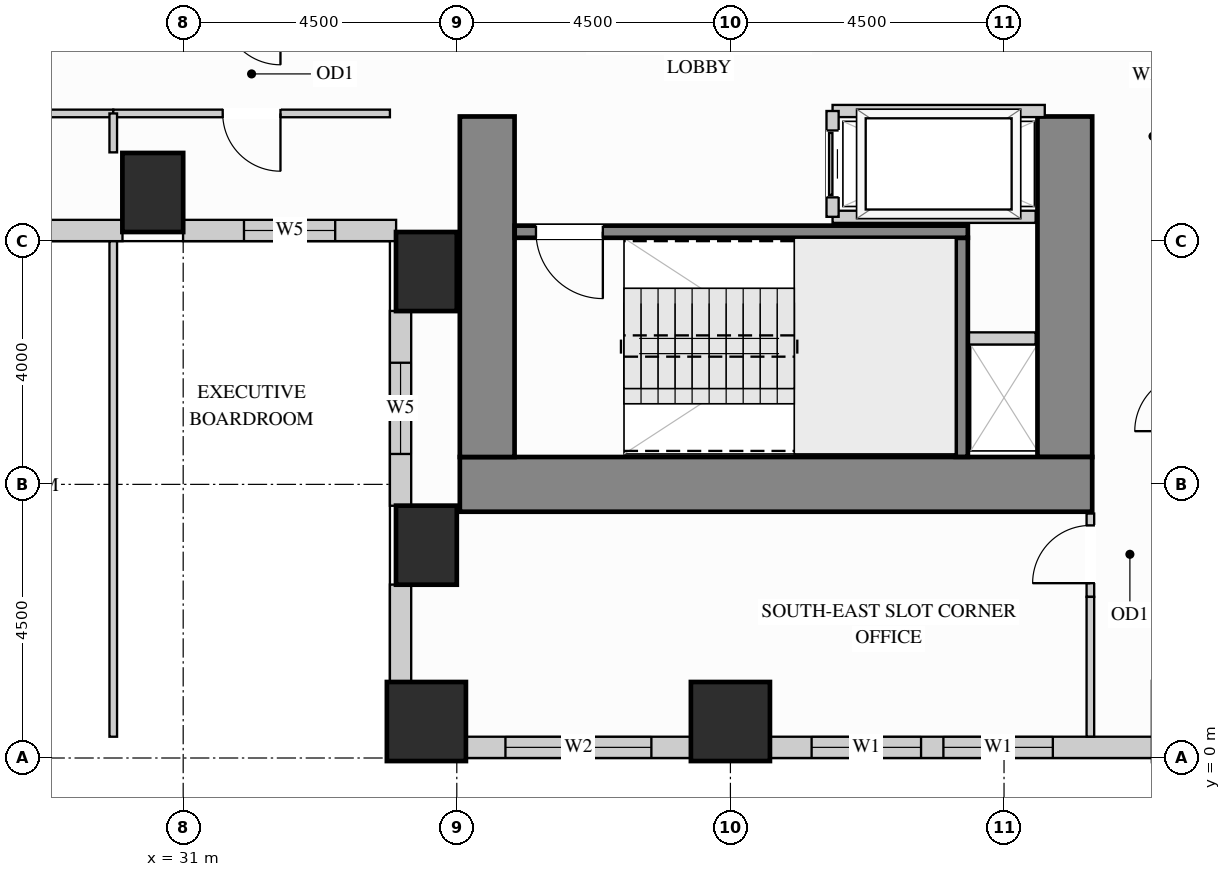
"""IFC4 building model, lengths in metres.
Left out: names, types, materials, properties, quantities, classifications, styles, units other than length and angle.
Written with IfcOpenShell. Run it as: python <this file> out.ifc"""

import sys

from ifc_helpers import new_model, si_unit, direction, frame, frame_2d, origin, origin_2d, place, context, subcontext, project, spatial, rectangle, extrude, source, transform, mapped, element, fill, save


model = new_model("IFC4")
c1 = context("Model", 3, precision=1e-05, world=origin(), true_north=direction((0.0, 1.0)))
c2 = subcontext(c1, "Body", "Model", "MODEL_VIEW")
j1 = project(units=[si_unit("LENGTHUNIT", "METRE"), si_unit("PLANEANGLEUNIT", "RADIAN")], contexts=[c1])
p1 = place(None, origin())
s1 = spatial("IfcSite", under=j1, at=p1, CompositionType="ELEMENT")
p2 = place(p1, origin())
s2 = spatial("IfcBuilding", under=s1, at=p2, CompositionType="ELEMENT")
p3 = place(p2, frame((0.0, 0.0, 69.3)))
s3 = spatial("IfcBuildingStorey", under=s2, at=p3, CompositionType="ELEMENT", Elevation=69.3)
m1 = source(origin(), c2, "Body", "SweptSolid", [
    extrude(rectangle(XDim=1.0, YDim=1.3, at=origin_2d()), origin(), (0.0, 0.0, 1.0), 3.32),
])
for number, where, z_axis, x_axis in (
    (1, (35.0, 3.5, 0.0), (0.0, 0.0, 1.0), (1.0, 0.0, 0.0)),
    (2, (35.0, 8.0, 0.0), (0.0, 0.0, 1.0), (1.0, 0.0, 0.0)),
    (3, (30.5, 9.3, 0.0), (0.0, 0.0, 1.0), (1.0, 0.0, 0.0)),
):
    element("IfcColumn", number, at=place(p3, frame(where, z_axis=z_axis, x_axis=x_axis)), inside=s3, PredefinedType="COLUMN", context=c2, shape_type="MappedRepresentation", body=[
        mapped(m1, transform((0.0, 0.0, 0.0), x_axis=(1.0, 0.0, 0.0), y_axis=(0.0, 1.0, 0.0), z_axis=(0.0, 0.0, 1.0))),
    ])
m2 = source(origin(), c2, "Body", "SweptSolid", [
    extrude(rectangle(XDim=1.3, YDim=1.3, at=origin_2d()), origin(), (0.0, 0.0, 1.0), 3.32),
])
for number, where, z_axis, x_axis in (
    (4, (35.0, 0.6, 0.0), (0.0, 0.0, 1.0), (1.0, 0.0, 0.0)),
    (5, (40.0, 0.6, 0.0), (0.0, 0.0, 1.0), (1.0, 0.0, 0.0)),
):
    element("IfcColumn", number, at=place(p3, frame(where, z_axis=z_axis, x_axis=x_axis)), inside=s3, PredefinedType="COLUMN", context=c2, shape_type="MappedRepresentation", body=[
        mapped(m2, transform((0.0, 0.0, 0.0), x_axis=(1.0, 0.0, 0.0), y_axis=(0.0, 1.0, 0.0), z_axis=(0.0, 0.0, 1.0))),
    ])
m3 = source(origin(), c2, "Body", "SweptSolid", [
    extrude(rectangle(XDim=5.6, YDim=0.9, at=frame_2d((2.8, 0.0))), origin(), (0.0, 0.0, 1.0), 3.32),
])
p4 = place(p3, frame((45.5, 4.95, 0.0), z_axis=(0.0, 0.0, 1.0), x_axis=(0.0, 1.0, 0.0)))
e6 = element("IfcWall", 6, at=p4, inside=s3, PredefinedType="SHEAR", context=c2, shape_type="MappedRepresentation", body=[
    mapped(m3, transform((0.0, 0.0, 0.0), x_axis=(1.0, 0.0, 0.0), y_axis=(0.0, 1.0, 0.0), z_axis=(0.0, 0.0, 1.0))),
])
m4 = source(origin(), c2, "Body", "SweptSolid", [
    extrude(rectangle(XDim=10.4, YDim=0.9, at=frame_2d((5.2, 0.0))), origin(), (0.0, 0.0, 1.0), 3.32),
])
p5 = place(p3, frame((35.55, 4.5, 0.0), z_axis=(0.0, 0.0, 1.0), x_axis=(1.0, 0.0, 0.0)))
e7 = element("IfcWall", 7, at=p5, inside=s3, PredefinedType="SHEAR", context=c2, shape_type="MappedRepresentation", body=[
    mapped(m4, transform((0.0, 0.0, 0.0), x_axis=(1.0, 0.0, 0.0), y_axis=(0.0, 1.0, 0.0), z_axis=(0.0, 0.0, 1.0))),
])
p6 = place(p3, frame((36.0, 4.95, 0.0), z_axis=(0.0, 0.0, 1.0), x_axis=(0.0, 1.0, 0.0)))
e8 = element("IfcWall", 8, at=p6, inside=s3, PredefinedType="SHEAR", context=c2, shape_type="MappedRepresentation", body=[
    mapped(m3, transform((0.0, 0.0, 0.0), x_axis=(1.0, 0.0, 0.0), y_axis=(0.0, 1.0, 0.0), z_axis=(0.0, 0.0, 1.0))),
])
p7 = place(p3, frame((23.898, 8.675, 0.0), z_axis=(0.0, 0.0, 1.0), x_axis=(1.0, 0.0, 0.0)))
e9 = element("IfcWall", 9, at=p7, inside=s3, PredefinedType="SOLIDWALL", context=c2, shape_type="SweptSolid", body=[
    extrude(rectangle(XDim=6.104, YDim=0.35, at=frame_2d((3.052, 0.0))), origin(), (0.0, 0.0, 1.0), 3.305),
])
p8 = place(p7, frame((1.114, 0.0, 0.78)))
e10 = element("IfcOpeningElement", 10, at=p8, cuts=e9, PredefinedType="OPENING", context=c2, shape_type="SweptSolid", body=[
    extrude(rectangle(XDim=1.5, YDim=2.0, at=frame_2d((0.75, 1.0))), frame((0.0, 0.185, 0.0), z_axis=(0.0, -1.0, 0.0), x_axis=(1.0, 0.0, 0.0)), (0.0, 0.0, 1.0), 0.37),
])
p9 = place(p7, frame((3.408, 0.0, 0.78)))
e11 = element("IfcOpeningElement", 11, at=p9, cuts=e9, PredefinedType="OPENING", context=c2, shape_type="SweptSolid", body=[
    extrude(rectangle(XDim=1.5, YDim=2.0, at=frame_2d((0.75, 1.0))), frame((0.0, 0.185, 0.0), z_axis=(0.0, -1.0, 0.0), x_axis=(1.0, 0.0, 0.0)), (0.0, 0.0, 1.0), 0.37),
])
p10 = place(p3, frame((30.998, 8.675, 0.0), z_axis=(0.0, 0.0, 1.0), x_axis=(1.0, 0.0, 0.0)))
e12 = element("IfcWall", 12, at=p10, inside=s3, PredefinedType="SOLIDWALL", context=c2, shape_type="SweptSolid", body=[
    extrude(rectangle(XDim=3.504, YDim=0.35, at=frame_2d((1.752, 0.0))), origin(), (0.0, 0.0, 1.0), 3.305),
])
p11 = place(p10, frame((1.002, 0.0, 0.78)))
e13 = element("IfcOpeningElement", 13, at=p11, cuts=e12, PredefinedType="OPENING", context=c2, shape_type="SweptSolid", body=[
    extrude(rectangle(XDim=1.5, YDim=2.0, at=frame_2d((0.75, 1.0))), frame((0.0, 0.185, 0.0), z_axis=(0.0, -1.0, 0.0), x_axis=(1.0, 0.0, 0.0)), (0.0, 0.0, 1.0), 0.37),
])
p12 = place(p3, frame((34.575, 7.352, 0.0), z_axis=(0.0, 0.0, 1.0), x_axis=(0.0, -1.0, 0.0)))
e14 = element("IfcWall", 14, at=p12, inside=s3, PredefinedType="SOLIDWALL", context=c2, shape_type="SweptSolid", body=[
    extrude(rectangle(XDim=3.204, YDim=0.35, at=frame_2d((1.602, 0.0))), origin(), (0.0, 0.0, 1.0), 2.45),
])
p13 = place(p12, frame((0.852, 0.0, 0.78)))
e15 = element("IfcOpeningElement", 15, at=p13, cuts=e14, PredefinedType="OPENING", context=c2, shape_type="SweptSolid", body=[
    extrude(rectangle(XDim=1.5, YDim=1.49, at=frame_2d((0.75, 0.745))), frame((0.0, 0.185, 0.0), z_axis=(0.0, -1.0, 0.0), x_axis=(1.0, 0.0, 0.0)), (0.0, 0.0, 1.0), 0.37),
])
m5 = source(origin(), c2, "Body", "SweptSolid", [
    extrude(rectangle(XDim=1.604, YDim=0.35, at=frame_2d((0.802, 0.0))), origin(), (0.0, 0.0, 1.0), 2.45),
])
p14 = place(p3, frame((34.575, 2.852, 0.0), z_axis=(0.0, 0.0, 1.0), x_axis=(0.0, -1.0, 0.0)))
e16 = element("IfcWall", 16, at=p14, inside=s3, PredefinedType="SOLIDWALL", context=c2, shape_type="MappedRepresentation", body=[
    mapped(m5, transform((0.0, 0.0, 0.0), x_axis=(1.0, 0.0, 0.0), y_axis=(0.0, 1.0, 0.0), z_axis=(0.0, 0.0, 1.0))),
])
p15 = place(p3, frame((35.648, 0.175, 0.0), z_axis=(0.0, 0.0, 1.0), x_axis=(1.0, 0.0, 0.0)))
e17 = element("IfcWall", 17, at=p15, inside=s3, PredefinedType="SOLIDWALL", context=c2, shape_type="SweptSolid", body=[
    extrude(rectangle(XDim=3.704, YDim=0.35, at=frame_2d((1.852, 0.0))), origin(), (0.0, 0.0, 1.0), 2.45),
])
p16 = place(p15, frame((0.652, 0.0, 0.78)))
e18 = element("IfcOpeningElement", 18, at=p16, cuts=e17, PredefinedType="OPENING", context=c2, shape_type="SweptSolid", body=[
    extrude(rectangle(XDim=2.4, YDim=1.49, at=frame_2d((1.2, 0.745))), frame((0.0, 0.185, 0.0), z_axis=(0.0, -1.0, 0.0), x_axis=(1.0, 0.0, 0.0)), (0.0, 0.0, 1.0), 0.37),
])
p17 = place(p3, frame((40.648, 0.175, 0.0), z_axis=(0.0, 0.0, 1.0), x_axis=(1.0, 0.0, 0.0)))
e19 = element("IfcWall", 19, at=p17, inside=s3, PredefinedType="SOLIDWALL", context=c2, shape_type="SweptSolid", body=[
    extrude(rectangle(XDim=6.304, YDim=0.35, at=frame_2d((3.152, 0.0))), origin(), (0.0, 0.0, 1.0), 2.45),
])
p18 = place(p17, frame((0.687, 0.0, 0.78)))
e20 = element("IfcOpeningElement", 20, at=p18, cuts=e19, PredefinedType="OPENING", context=c2, shape_type="SweptSolid", body=[
    extrude(rectangle(XDim=1.8, YDim=1.49, at=frame_2d((0.9, 0.745))), frame((0.0, 0.185, 0.0), z_axis=(0.0, -1.0, 0.0), x_axis=(1.0, 0.0, 0.0)), (0.0, 0.0, 1.0), 0.37),
])
p19 = place(p17, frame((2.855, 0.0, 0.78)))
e21 = element("IfcOpeningElement", 21, at=p19, cuts=e19, PredefinedType="OPENING", context=c2, shape_type="SweptSolid", body=[
    extrude(rectangle(XDim=1.8, YDim=1.49, at=frame_2d((0.9, 0.745))), frame((0.0, 0.185, 0.0), z_axis=(0.0, -1.0, 0.0), x_axis=(1.0, 0.0, 0.0)), (0.0, 0.0, 1.0), 0.37),
])
p20 = place(p3, frame((45.92, 2.65, 0.0), z_axis=(0.0, 0.0, 1.0), x_axis=(0.0, 1.0, 0.0)))
e22 = element("IfcWall", 22, at=p20, inside=s3, PredefinedType="PARTITIONING", context=c2, shape_type="SweptSolid", body=[
    extrude(rectangle(XDim=1.37, YDim=0.125, at=frame_2d((0.685, 0.0))), origin(), (0.0, 0.0, 1.0), 3.305),
])
p21 = place(p20, frame((0.225, 0.0, 0.0)))
e23 = element("IfcOpeningElement", 23, at=p21, cuts=e22, PredefinedType="OPENING", context=c2, shape_type="SweptSolid", body=[
    extrude(rectangle(XDim=0.95, YDim=2.15, at=frame_2d((0.475, 1.075))), frame((0.0, 0.073, 0.0), z_axis=(0.0, -1.0, 0.0), x_axis=(1.0, 0.0, 0.0)), (0.0, 0.0, 1.0), 0.145),
])
m6 = source(origin(), c2, "Body", "SweptSolid", [
    extrude(rectangle(XDim=2.298, YDim=0.125, at=frame_2d((1.149, 0.0))), origin(), (0.0, 0.0, 1.0), 3.305),
])
p22 = place(p3, frame((45.92, 0.352, 0.0), z_axis=(0.0, 0.0, 1.0), x_axis=(0.0, 1.0, 0.0)))
e24 = element("IfcWall", 24, at=p22, inside=s3, PredefinedType="PARTITIONING", context=c2, shape_type="MappedRepresentation", body=[
    mapped(m6, transform((0.0, 0.0, 0.0), x_axis=(1.0, 0.0, 0.0), y_axis=(0.0, 1.0, 0.0), z_axis=(0.0, 0.0, 1.0))),
])
p23 = place(p3, frame((23.85, 10.6, 0.0), z_axis=(0.0, 0.0, 1.0), x_axis=(1.0, 0.0, 0.0)))
e25 = element("IfcWall", 25, at=p23, inside=s3, PredefinedType="PARTITIONING", context=c2, shape_type="SweptSolid", body=[
    extrude(rectangle(XDim=6.0, YDim=0.125, at=frame_2d((3.0, 0.0))), origin(), (0.0, 0.0, 1.0), 3.305),
])
p24 = place(p23, frame((2.525, 0.0, 0.0)))
e26 = element("IfcOpeningElement", 26, at=p24, cuts=e25, PredefinedType="OPENING", context=c2, shape_type="SweptSolid", body=[
    extrude(rectangle(XDim=0.95, YDim=2.15, at=frame_2d((0.475, 1.075))), frame((0.0, 0.073, 0.0), z_axis=(0.0, -1.0, 0.0), x_axis=(1.0, 0.0, 0.0)), (0.0, 0.0, 1.0), 0.145),
])
p25 = place(p3, frame((29.85, 10.6, 0.0), z_axis=(0.0, 0.0, 1.0), x_axis=(1.0, 0.0, 0.0)))
e27 = element("IfcWall", 27, at=p25, inside=s3, PredefinedType="PARTITIONING", context=c2, shape_type="SweptSolid", body=[
    extrude(rectangle(XDim=4.55, YDim=0.125, at=frame_2d((2.275, 0.0))), origin(), (0.0, 0.0, 1.0), 3.305),
])
p26 = place(p25, frame((1.8, 0.0, 0.0)))
e28 = element("IfcOpeningElement", 28, at=p26, cuts=e27, PredefinedType="OPENING", context=c2, shape_type="SweptSolid", body=[
    extrude(rectangle(XDim=0.95, YDim=2.15, at=frame_2d((0.475, 1.075))), frame((0.0, 0.073, 0.0), z_axis=(0.0, -1.0, 0.0), x_axis=(1.0, 0.0, 0.0)), (0.0, 0.0, 1.0), 0.145),
])
m7 = source(origin(), c2, "Body", "SweptSolid", [
    extrude(rectangle(XDim=8.148, YDim=0.125, at=frame_2d((4.074, 0.0))), origin(), (0.0, 0.0, 1.0), 3.305),
])
p27 = place(p3, frame((29.85, 0.35, 0.0), z_axis=(0.0, 0.0, 1.0), x_axis=(0.0, 1.0, 0.0)))
e29 = element("IfcWall", 29, at=p27, inside=s3, PredefinedType="PARTITIONING", context=c2, shape_type="MappedRepresentation", body=[
    mapped(m7, transform((0.0, 0.0, 0.0), x_axis=(1.0, 0.0, 0.0), y_axis=(0.0, 1.0, 0.0), z_axis=(0.0, 0.0, 1.0))),
])
m8 = source(origin(), c2, "Body", "SweptSolid", [
    extrude(rectangle(XDim=0.64, YDim=0.125, at=frame_2d((0.32, 0.0))), origin(), (0.0, 0.0, 1.0), 3.305),
])
p28 = place(p3, frame((29.85, 9.96, 0.0), z_axis=(0.0, 0.0, 1.0), x_axis=(0.0, 1.0, 0.0)))
e30 = element("IfcWall", 30, at=p28, inside=s3, PredefinedType="PARTITIONING", context=c2, shape_type="MappedRepresentation", body=[
    mapped(m8, transform((0.0, 0.0, 0.0), x_axis=(1.0, 0.0, 0.0), y_axis=(0.0, 1.0, 0.0), z_axis=(0.0, 0.0, 1.0))),
])
m9 = source(origin(), c2, "Body", "SweptSolid", [
    extrude(rectangle(XDim=1.17, YDim=0.2, at=frame_2d((0.585, 0.0))), origin(), (0.0, 0.0, 1.0), 3.305),
])
p29 = place(p3, frame((43.85, 6.9, 0.0), z_axis=(0.0, 0.0, 1.0), x_axis=(1.0, 0.0, 0.0)))
e31 = element("IfcWall", 31, at=p29, inside=s3, PredefinedType="PARTITIONING", context=c2, shape_type="MappedRepresentation", body=[
    mapped(m9, transform((0.0, 0.0, 0.0), x_axis=(1.0, 0.0, 0.0), y_axis=(0.0, 1.0, 0.0), z_axis=(0.0, 0.0, 1.0))),
])
m10 = source(origin(), c2, "Body", "SweptSolid", [
    extrude(rectangle(XDim=3.49, YDim=0.2, at=frame_2d((1.745, 0.0))), origin(), (0.0, 0.0, 1.0), 3.305),
])
p30 = place(p3, frame((41.68, 10.64, 0.0), z_axis=(0.0, 0.0, 1.0), x_axis=(1.0, 0.0, 0.0)))
e32 = element("IfcWall", 32, at=p30, inside=s3, PredefinedType="PARTITIONING", context=c2, shape_type="MappedRepresentation", body=[
    mapped(m10, transform((0.0, 0.0, 0.0), x_axis=(1.0, 0.0, 0.0), y_axis=(0.0, 1.0, 0.0), z_axis=(0.0, 0.0, 1.0))),
])
m11 = source(origin(), c2, "Body", "SweptSolid", [
    extrude(rectangle(XDim=3.34, YDim=0.2, at=frame_2d((1.67, 0.0))), origin(), (0.0, 0.0, 1.0), 3.305),
])
p31 = place(p3, frame((41.68, 8.9, 0.0), z_axis=(0.0, 0.0, 1.0), x_axis=(1.0, 0.0, 0.0)))
e33 = element("IfcWall", 33, at=p31, inside=s3, PredefinedType="PARTITIONING", context=c2, shape_type="MappedRepresentation", body=[
    mapped(m11, transform((0.0, 0.0, 0.0), x_axis=(1.0, 0.0, 0.0), y_axis=(0.0, 1.0, 0.0), z_axis=(0.0, 0.0, 1.0))),
])
p32 = place(p3, frame((41.68, 8.9, 0.0), z_axis=(0.0, 0.0, 1.0), x_axis=(0.0, 1.0, 0.0)))
e34 = element("IfcWall", 34, at=p32, inside=s3, PredefinedType="PARTITIONING", context=c2, shape_type="SweptSolid", body=[
    extrude(rectangle(XDim=1.74, YDim=0.2, at=frame_2d((0.87, 0.0))), origin(), (0.0, 0.0, 1.0), 3.305),
])
p33 = place(p32, frame((0.32, 0.0, 0.0)))
e35 = element("IfcOpeningElement", 35, at=p33, cuts=e34, PredefinedType="OPENING", context=c2, shape_type="SweptSolid", body=[
    extrude(rectangle(XDim=1.1, YDim=2.2, at=frame_2d((0.55, 1.1))), frame((0.0, 0.11, 0.0), z_axis=(0.0, -1.0, 0.0), x_axis=(1.0, 0.0, 0.0)), (0.0, 0.0, 1.0), 0.22),
])
m12 = source(origin(), c2, "Body", "SweptSolid", [
    extrude(rectangle(XDim=3.603, YDim=0.2, at=frame_2d((1.802, 0.0))), origin(), (0.0, 0.0, 1.0), 3.32),
])
p34 = place(p3, frame((43.805, 4.952, 0.0), z_axis=(0.0, 0.0, 1.0), x_axis=(0.0, 1.0, 0.0)))
e36 = element("IfcWall", 36, at=p34, inside=s3, PredefinedType="SHEAR", context=c2, shape_type="MappedRepresentation", body=[
    mapped(m12, transform((0.0, 0.0, 0.0), x_axis=(1.0, 0.0, 0.0), y_axis=(0.0, 1.0, 0.0), z_axis=(0.0, 0.0, 1.0))),
])
p35 = place(p3, frame((36.452, 8.655, 0.0), z_axis=(0.0, 0.0, 1.0), x_axis=(1.0, 0.0, 0.0)))
e37 = element("IfcWall", 37, at=p35, inside=s3, PredefinedType="SHEAR", context=c2, shape_type="SweptSolid", body=[
    extrude(rectangle(XDim=7.453, YDim=0.2, at=frame_2d((3.727, 0.0))), origin(), (0.0, 0.0, 1.0), 3.32),
])
p36 = place(p35, frame((0.35, 0.0, 0.0)))
e38 = element("IfcOpeningElement", 38, at=p36, cuts=e37, PredefinedType="OPENING", context=c2, shape_type="SweptSolid", body=[
    extrude(rectangle(XDim=1.1, YDim=2.15, at=frame_2d((0.55, 1.075))), frame((0.0, 0.11, 0.0), z_axis=(0.0, -1.0, 0.0), x_axis=(1.0, 0.0, 0.0)), (0.0, 0.0, 1.0), 0.22),
])
m13 = source(origin(), c2, "Body", "SweptSolid", [
    extrude(rectangle(XDim=1.1, YDim=2.2, at=frame_2d((0.55, 1.1))), frame((0.0, 0.025, 0.0), z_axis=(0.0, -1.0, 0.0), x_axis=(1.0, 0.0, 0.0)), (0.0, 0.0, 1.0), 0.05),
])
p37 = place(p33, origin())
e39 = element("IfcDoor", 39, at=p37, inside=s3, OperationType="SLIDING_TO_LEFT", PredefinedType="DOOR", context=c2, shape_type="MappedRepresentation", body=[
    mapped(m13, transform((0.0, 0.0, 0.0), x_axis=(1.0, 0.0, 0.0), y_axis=(0.0, 1.0, 0.0), z_axis=(0.0, 0.0, 1.0))),
])
fill(e35, e39)
m14 = source(origin(), c2, "Body", "SweptSolid", [
    extrude(rectangle(XDim=0.95, YDim=2.15, at=frame_2d((0.475, 1.075))), frame((0.0, 0.025, 0.0), z_axis=(0.0, -1.0, 0.0), x_axis=(1.0, 0.0, 0.0)), (0.0, 0.0, 1.0), 0.05),
])
p38 = place(p21, origin())
e40 = element("IfcDoor", 40, at=p38, inside=s3, OperationType="SINGLE_SWING_LEFT", PredefinedType="DOOR", context=c2, shape_type="MappedRepresentation", body=[
    mapped(m14, transform((0.0, 0.0, 0.0), x_axis=(1.0, 0.0, 0.0), y_axis=(0.0, 1.0, 0.0), z_axis=(0.0, 0.0, 1.0))),
])
fill(e23, e40)
p39 = place(p26, origin())
e41 = element("IfcDoor", 41, at=p39, inside=s3, OperationType="SINGLE_SWING_RIGHT", PredefinedType="DOOR", context=c2, shape_type="MappedRepresentation", body=[
    mapped(m14, transform((0.0, 0.0, 0.0), x_axis=(1.0, 0.0, 0.0), y_axis=(0.0, 1.0, 0.0), z_axis=(0.0, 0.0, 1.0))),
])
fill(e28, e41)
m15 = source(origin(), c2, "Body", "SweptSolid", [
    extrude(rectangle(XDim=1.1, YDim=2.15, at=frame_2d((0.55, 1.075))), frame((0.0, 0.025, 0.0), z_axis=(0.0, -1.0, 0.0), x_axis=(1.0, 0.0, 0.0)), (0.0, 0.0, 1.0), 0.05),
])
p40 = place(p36, origin())
e42 = element("IfcDoor", 42, at=p40, inside=s3, OperationType="SINGLE_SWING_RIGHT", PredefinedType="DOOR", context=c2, shape_type="MappedRepresentation", body=[
    mapped(m15, transform((0.0, 0.0, 0.0), x_axis=(1.0, 0.0, 0.0), y_axis=(0.0, 1.0, 0.0), z_axis=(0.0, 0.0, 1.0))),
])
fill(e38, e42)
m16 = source(origin(), c2, "Body", "SweptSolid", [
    extrude(rectangle(XDim=1.8, YDim=1.49, at=frame_2d((0.9, 0.745))), frame((0.0, 0.03, 0.0), z_axis=(0.0, -1.0, 0.0), x_axis=(1.0, 0.0, 0.0)), (0.0, 0.0, 1.0), 0.06),
])
p41 = place(p18, origin())
e43 = element("IfcWindow", 43, at=p41, inside=s3, PartitioningType="SINGLE_PANEL", PredefinedType="WINDOW", context=c2, shape_type="MappedRepresentation", body=[
    mapped(m16, transform((0.0, 0.0, 0.0), x_axis=(1.0, 0.0, 0.0), y_axis=(0.0, 1.0, 0.0), z_axis=(0.0, 0.0, 1.0))),
])
fill(e20, e43)
p42 = place(p19, origin())
e44 = element("IfcWindow", 44, at=p42, inside=s3, PartitioningType="SINGLE_PANEL", PredefinedType="WINDOW", context=c2, shape_type="MappedRepresentation", body=[
    mapped(m16, transform((0.0, 0.0, 0.0), x_axis=(1.0, 0.0, 0.0), y_axis=(0.0, 1.0, 0.0), z_axis=(0.0, 0.0, 1.0))),
])
fill(e21, e44)
m17 = source(origin(), c2, "Body", "SweptSolid", [
    extrude(rectangle(XDim=2.4, YDim=1.49, at=frame_2d((1.2, 0.745))), frame((0.0, 0.03, 0.0), z_axis=(0.0, -1.0, 0.0), x_axis=(1.0, 0.0, 0.0)), (0.0, 0.0, 1.0), 0.06),
])
p43 = place(p16, origin())
e45 = element("IfcWindow", 45, at=p43, inside=s3, PartitioningType="SINGLE_PANEL", PredefinedType="WINDOW", context=c2, shape_type="MappedRepresentation", body=[
    mapped(m17, transform((0.0, 0.0, 0.0), x_axis=(1.0, 0.0, 0.0), y_axis=(0.0, 1.0, 0.0), z_axis=(0.0, 0.0, 1.0))),
])
fill(e18, e45)
m18 = source(origin(), c2, "Body", "SweptSolid", [
    extrude(rectangle(XDim=1.5, YDim=2.0, at=frame_2d((0.75, 1.0))), frame((0.0, 0.03, 0.0), z_axis=(0.0, -1.0, 0.0), x_axis=(1.0, 0.0, 0.0)), (0.0, 0.0, 1.0), 0.06),
])
p44 = place(p11, origin())
e46 = element("IfcWindow", 46, at=p44, inside=s3, PartitioningType="SINGLE_PANEL", PredefinedType="WINDOW", context=c2, shape_type="MappedRepresentation", body=[
    mapped(m18, transform((0.0, 0.0, 0.0), x_axis=(1.0, 0.0, 0.0), y_axis=(0.0, 1.0, 0.0), z_axis=(0.0, 0.0, 1.0))),
])
fill(e13, e46)
m19 = source(origin(), c2, "Body", "SweptSolid", [
    extrude(rectangle(XDim=1.5, YDim=1.49, at=frame_2d((0.75, 0.745))), frame((0.0, 0.03, 0.0), z_axis=(0.0, -1.0, 0.0), x_axis=(1.0, 0.0, 0.0)), (0.0, 0.0, 1.0), 0.06),
])
p45 = place(p13, origin())
e47 = element("IfcWindow", 47, at=p45, inside=s3, PartitioningType="SINGLE_PANEL", PredefinedType="WINDOW", context=c2, shape_type="MappedRepresentation", body=[
    mapped(m19, transform((0.0, 0.0, 0.0), x_axis=(1.0, 0.0, 0.0), y_axis=(0.0, 1.0, 0.0), z_axis=(0.0, 0.0, 1.0))),
])
fill(e15, e47)
save(model, sys.argv[1])
